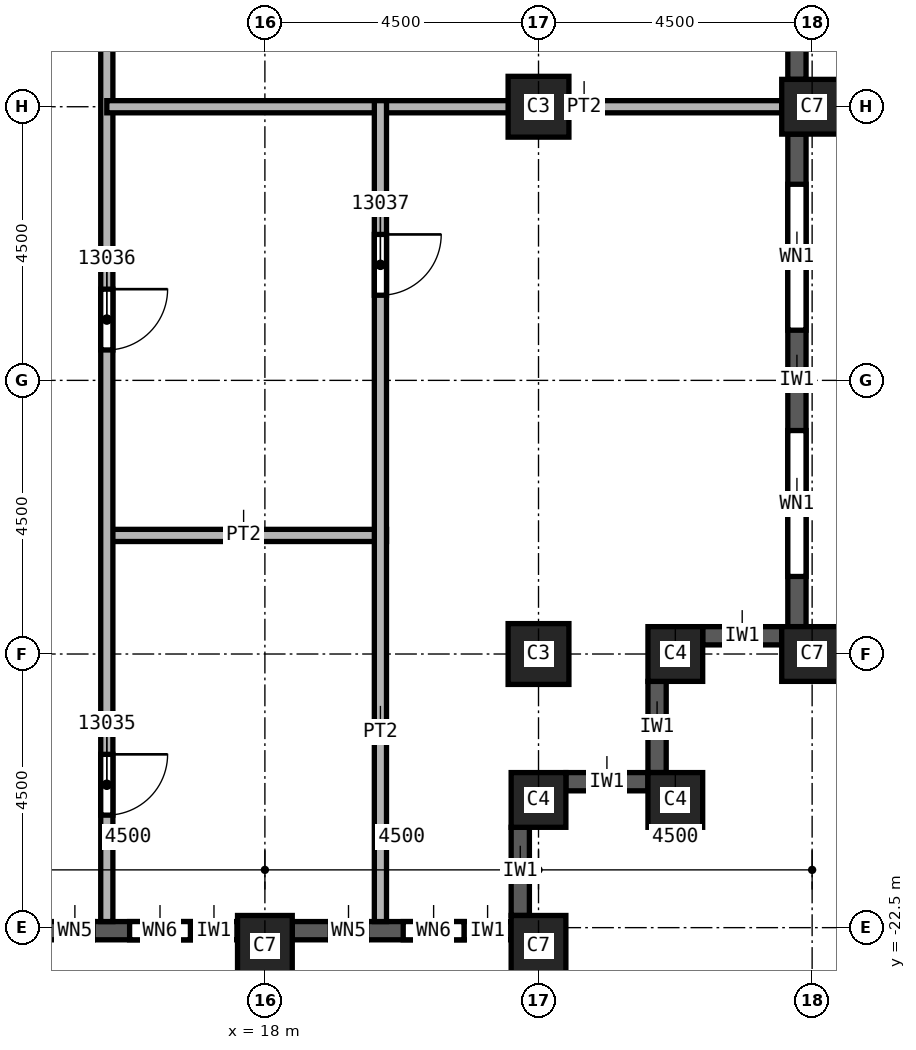
"""IFC4 building model, lengths in metres.
Left out: names, types, materials, properties, quantities, classifications, styles, units other than length and angle.
Written with IfcOpenShell. Run it as: python <this file> out.ifc"""

import sys

from ifc_helpers import new_model, si_unit, direction, frame, frame_2d, origin, origin_2d, place, context, subcontext, project, spatial, rectangle, extrude, element, fill, save


model = new_model("IFC4")
c1 = context("Model", 3, precision=1e-05, world=origin(), true_north=direction((0.0, 1.0)))
c2 = subcontext(c1, "Body", "Model", "MODEL_VIEW")
j1 = project(units=[si_unit("LENGTHUNIT", "METRE"), si_unit("PLANEANGLEUNIT", "RADIAN")], contexts=[c1])
p1 = place(None, origin())
s1 = spatial("IfcSite", under=j1, at=p1, CompositionType="ELEMENT")
p2 = place(p1, origin())
s2 = spatial("IfcBuilding", under=s1, at=p2, CompositionType="ELEMENT")
p3 = place(p2, frame((0.0, 0.0, 208.0)))
s3 = spatial("IfcBuildingStorey", under=s2, at=p3, CompositionType="ELEMENT", Elevation=208.0)
for number, where, z_axis, x_axis in (
    (1, (22.5, -9.0, 0.0), (0.0, 0.0, 1.0), (1.0, 0.0, 0.0)),
    (2, (22.5, -18.0, 0.0), (0.0, 0.0, 1.0), (1.0, 0.0, 0.0)),
):
    element("IfcColumn", number, at=place(p3, frame(where, z_axis=z_axis, x_axis=x_axis)), inside=s3, PredefinedType="COLUMN", context=c2, shape_type="SweptSolid", body=[
        extrude(rectangle(XDim=1.0, YDim=1.0, at=origin_2d()), origin(), (0.0, 0.0, 1.0), 3.72),
    ])
for number, where, z_axis, x_axis in (
    (3, (27.0, -9.0, 0.0), (0.0, 0.0, 1.0), (0.0, 1.0, 0.0)),
    (4, (27.0, -18.0, 0.0), (0.0, 0.0, 1.0), (0.0, 1.0, 0.0)),
    (5, (18.0, -22.8, 0.0), (0.0, 0.0, 1.0), (1.0, 0.0, 0.0)),
    (6, (22.5, -22.8, 0.0), (0.0, 0.0, 1.0), (1.0, 0.0, 0.0)),
):
    element("IfcColumn", number, at=place(p3, frame(where, z_axis=z_axis, x_axis=x_axis)), inside=s3, PredefinedType="COLUMN", context=c2, shape_type="SweptSolid", body=[
        extrude(rectangle(XDim=0.9, YDim=1.0, at=origin_2d()), origin(), (0.0, 0.0, 1.0), 3.72),
    ])
for number, where, z_axis, x_axis in (
    (7, (22.5, -20.4, 0.0), (0.0, 0.0, 1.0), (1.0, 0.0, 0.0)),
    (8, (24.75, -20.4, 0.0), (0.0, 0.0, 1.0), (1.0, 0.0, 0.0)),
    (9, (24.75, -18.0, 0.0), (0.0, 0.0, 1.0), (1.0, 0.0, 0.0)),
):
    element("IfcColumn", number, at=place(p3, frame(where, z_axis=z_axis, x_axis=x_axis)), inside=s3, PredefinedType="COLUMN", context=c2, shape_type="SweptSolid", body=[
        extrude(rectangle(XDim=0.9, YDim=0.9, at=origin_2d()), origin(), (0.0, 0.0, 1.0), 3.72),
    ])
p4 = place(p3, frame((13.95, -22.55, 0.0), z_axis=(0.0, 0.0, 1.0), x_axis=(1.0, 0.0, 0.0)))
e10 = element("IfcWall", 10, at=p4, inside=s3, PredefinedType="SOLIDWALL", context=c2, shape_type="SweptSolid", body=[
    extrude(rectangle(XDim=3.6, YDim=0.3, at=frame_2d((1.8, 0.0))), origin(), (0.0, 0.0, 1.0), 3.12),
])
p5 = place(p4, frame((0.625, 0.0, 0.8)))
e11 = element("IfcOpeningElement", 11, at=p5, cuts=e10, PredefinedType="OPENING", context=c2, shape_type="SweptSolid", body=[
    extrude(rectangle(XDim=0.6, YDim=1.95, at=frame_2d((0.3, 0.975))), frame((0.0, 0.15, 0.0), z_axis=(0.0, -1.0, 0.0), x_axis=(1.0, 0.0, 0.0)), (0.0, 0.0, 1.0), 0.3),
])
p6 = place(p4, frame((1.825, 0.0, 0.8)))
e12 = element("IfcOpeningElement", 12, at=p6, cuts=e10, PredefinedType="OPENING", context=c2, shape_type="SweptSolid", body=[
    extrude(rectangle(XDim=1.0, YDim=1.95, at=frame_2d((0.5, 0.975))), frame((0.0, 0.15, 0.0), z_axis=(0.0, -1.0, 0.0), x_axis=(1.0, 0.0, 0.0)), (0.0, 0.0, 1.0), 0.3),
])
p7 = place(p3, frame((18.45, -22.55, 0.0), z_axis=(0.0, 0.0, 1.0), x_axis=(1.0, 0.0, 0.0)))
e13 = element("IfcWall", 13, at=p7, inside=s3, PredefinedType="SOLIDWALL", context=c2, shape_type="SweptSolid", body=[
    extrude(rectangle(XDim=3.6, YDim=0.3, at=frame_2d((1.8, 0.0))), origin(), (0.0, 0.0, 1.0), 3.12),
])
p8 = place(p7, frame((0.625, 0.0, 0.8)))
e14 = element("IfcOpeningElement", 14, at=p8, cuts=e13, PredefinedType="OPENING", context=c2, shape_type="SweptSolid", body=[
    extrude(rectangle(XDim=0.6, YDim=1.95, at=frame_2d((0.3, 0.975))), frame((0.0, 0.15, 0.0), z_axis=(0.0, -1.0, 0.0), x_axis=(1.0, 0.0, 0.0)), (0.0, 0.0, 1.0), 0.3),
])
p9 = place(p7, frame((1.825, 0.0, 0.8)))
e15 = element("IfcOpeningElement", 15, at=p9, cuts=e13, PredefinedType="OPENING", context=c2, shape_type="SweptSolid", body=[
    extrude(rectangle(XDim=1.0, YDim=1.95, at=frame_2d((0.5, 0.975))), frame((0.0, 0.15, 0.0), z_axis=(0.0, -1.0, 0.0), x_axis=(1.0, 0.0, 0.0)), (0.0, 0.0, 1.0), 0.3),
])
p10 = place(p3, frame((22.2, -22.3, 0.0), z_axis=(0.0, 0.0, 1.0), x_axis=(0.0, 1.0, 0.0)))
e16 = element("IfcWall", 16, at=p10, inside=s3, PredefinedType="SOLIDWALL", context=c2, shape_type="SweptSolid", body=[
    extrude(rectangle(XDim=1.45, YDim=0.3, at=frame_2d((0.725, 0.0))), origin(), (0.0, 0.0, 1.0), 3.12),
])
p11 = place(p3, frame((22.95, -20.1, 0.0), z_axis=(0.0, 0.0, 1.0), x_axis=(1.0, 0.0, 0.0)))
e17 = element("IfcWall", 17, at=p11, inside=s3, PredefinedType="SOLIDWALL", context=c2, shape_type="SweptSolid", body=[
    extrude(rectangle(XDim=1.35, YDim=0.3, at=frame_2d((0.675, 0.0))), origin(), (0.0, 0.0, 1.0), 3.12),
])
p12 = place(p3, frame((24.45, -19.95, 0.0), z_axis=(0.0, 0.0, 1.0), x_axis=(0.0, 1.0, 0.0)))
e18 = element("IfcWall", 18, at=p12, inside=s3, PredefinedType="SOLIDWALL", context=c2, shape_type="SweptSolid", body=[
    extrude(rectangle(XDim=1.5, YDim=0.3, at=frame_2d((0.75, 0.0))), origin(), (0.0, 0.0, 1.0), 3.12),
])
p13 = place(p3, frame((25.2, -17.7, 0.0), z_axis=(0.0, 0.0, 1.0), x_axis=(1.0, 0.0, 0.0)))
e19 = element("IfcWall", 19, at=p13, inside=s3, PredefinedType="SOLIDWALL", context=c2, shape_type="SweptSolid", body=[
    extrude(rectangle(XDim=1.3, YDim=0.3, at=frame_2d((0.65, 0.0))), origin(), (0.0, 0.0, 1.0), 3.12),
])
p14 = place(p3, frame((26.75, -17.55, 0.0), z_axis=(0.0, 0.0, 1.0), x_axis=(0.0, 1.0, 0.0)))
e20 = element("IfcWall", 20, at=p14, inside=s3, PredefinedType="SOLIDWALL", context=c2, shape_type="SweptSolid", body=[
    extrude(rectangle(XDim=8.1, YDim=0.3, at=frame_2d((4.05, 0.0))), origin(), (0.0, 0.0, 1.0), 3.12),
])
p15 = place(p14, frame((0.825, 0.0, 0.8)))
e21 = element("IfcOpeningElement", 21, at=p15, cuts=e20, PredefinedType="OPENING", context=c2, shape_type="SweptSolid", body=[
    extrude(rectangle(XDim=2.4, YDim=1.95, at=frame_2d((1.2, 0.975))), frame((0.0, 0.15, 0.0), z_axis=(0.0, -1.0, 0.0), x_axis=(1.0, 0.0, 0.0)), (0.0, 0.0, 1.0), 0.3),
])
p16 = place(p14, frame((4.875, 0.0, 0.8)))
e22 = element("IfcOpeningElement", 22, at=p16, cuts=e20, PredefinedType="OPENING", context=c2, shape_type="SweptSolid", body=[
    extrude(rectangle(XDim=2.4, YDim=1.95, at=frame_2d((1.2, 0.975))), frame((0.0, 0.15, 0.0), z_axis=(0.0, -1.0, 0.0), x_axis=(1.0, 0.0, 0.0)), (0.0, 0.0, 1.0), 0.3),
])
p17 = place(p3, frame((26.75, -8.55, 0.0), z_axis=(0.0, 0.0, 1.0), x_axis=(0.0, 1.0, 0.0)))
e23 = element("IfcWall", 23, at=p17, inside=s3, PredefinedType="SOLIDWALL", context=c2, shape_type="SweptSolid", body=[
    extrude(rectangle(XDim=8.1, YDim=0.3, at=frame_2d((4.05, 0.0))), origin(), (0.0, 0.0, 1.0), 3.12),
])
p18 = place(p17, frame((0.825, 0.0, 0.8)))
e24 = element("IfcOpeningElement", 24, at=p18, cuts=e23, PredefinedType="OPENING", context=c2, shape_type="SweptSolid", body=[
    extrude(rectangle(XDim=2.4, YDim=1.95, at=frame_2d((1.2, 0.975))), frame((0.0, 0.15, 0.0), z_axis=(0.0, -1.0, 0.0), x_axis=(1.0, 0.0, 0.0)), (0.0, 0.0, 1.0), 0.3),
])
p19 = place(p17, frame((4.875, 0.0, 0.8)))
e25 = element("IfcOpeningElement", 25, at=p19, cuts=e23, PredefinedType="OPENING", context=c2, shape_type="SweptSolid", body=[
    extrude(rectangle(XDim=2.4, YDim=1.95, at=frame_2d((1.2, 0.975))), frame((0.0, 0.15, 0.0), z_axis=(0.0, -1.0, 0.0), x_axis=(1.0, 0.0, 0.0)), (0.0, 0.0, 1.0), 0.3),
])
p20 = place(p3, frame((15.4, -16.05, 0.0), z_axis=(0.0, 0.0, 1.0), x_axis=(1.0, 0.0, 0.0)))
e26 = element("IfcWall", 26, at=p20, inside=s3, PredefinedType="PARTITIONING", context=c2, shape_type="SweptSolid", body=[
    extrude(rectangle(XDim=4.6, YDim=0.2, at=frame_2d((2.3, 0.0))), origin(), (0.0, 0.0, 1.0), 3.72),
])
p21 = place(p3, frame((15.4, 22.4, 0.0), z_axis=(0.0, 0.0, 1.0), x_axis=(0.0, -1.0, 0.0)))
e27 = element("IfcWall", 27, at=p21, inside=s3, PredefinedType="PARTITIONING", context=c2, shape_type="SweptSolid", body=[
    extrude(rectangle(XDim=44.8, YDim=0.2, at=frame_2d((22.4, 0.0))), origin(), (0.0, 0.0, 1.0), 3.72),
])
p22 = place(p21, frame((12.5, 0.0, 0.0)))
e28 = element("IfcOpeningElement", 28, at=p22, cuts=e27, PredefinedType="OPENING", context=c2, shape_type="SweptSolid", body=[
    extrude(rectangle(XDim=1.0, YDim=2.1, at=frame_2d((0.5, 1.05))), frame((0.0, 0.1, 0.0), z_axis=(0.0, -1.0, 0.0), x_axis=(1.0, 0.0, 0.0)), (0.0, 0.0, 1.0), 0.2),
])
p23 = place(p21, frame((7.7, 0.0, 0.0)))
e29 = element("IfcOpeningElement", 29, at=p23, cuts=e27, PredefinedType="OPENING", context=c2, shape_type="SweptSolid", body=[
    extrude(rectangle(XDim=1.0, YDim=2.1, at=frame_2d((0.5, 1.05))), frame((0.0, 0.1, 0.0), z_axis=(0.0, -1.0, 0.0), x_axis=(1.0, 0.0, 0.0)), (0.0, 0.0, 1.0), 0.2),
])
p24 = place(p21, frame((3.25, 0.0, 0.0)))
e30 = element("IfcOpeningElement", 30, at=p24, cuts=e27, PredefinedType="OPENING", context=c2, shape_type="SweptSolid", body=[
    extrude(rectangle(XDim=1.0, YDim=2.1, at=frame_2d((0.5, 1.05))), frame((0.0, 0.1, 0.0), z_axis=(0.0, -1.0, 0.0), x_axis=(1.0, 0.0, 0.0)), (0.0, 0.0, 1.0), 0.2),
])
p25 = place(p21, frame((42.05, 0.0, 0.0)))
e31 = element("IfcOpeningElement", 31, at=p25, cuts=e27, PredefinedType="OPENING", context=c2, shape_type="SweptSolid", body=[
    extrude(rectangle(XDim=1.0, YDim=2.1, at=frame_2d((0.5, 1.05))), frame((0.0, 0.1, 0.0), z_axis=(0.0, -1.0, 0.0), x_axis=(1.0, 0.0, 0.0)), (0.0, 0.0, 1.0), 0.2),
])
p26 = place(p21, frame((34.4, 0.0, 0.0)))
e32 = element("IfcOpeningElement", 32, at=p26, cuts=e27, PredefinedType="OPENING", context=c2, shape_type="SweptSolid", body=[
    extrude(rectangle(XDim=1.0, YDim=2.1, at=frame_2d((0.5, 1.05))), frame((0.0, 0.1, 0.0), z_axis=(0.0, -1.0, 0.0), x_axis=(1.0, 0.0, 0.0)), (0.0, 0.0, 1.0), 0.2),
])
p27 = place(p21, frame((27.05, 0.0, 0.0)))
e33 = element("IfcOpeningElement", 33, at=p27, cuts=e27, PredefinedType="OPENING", context=c2, shape_type="SweptSolid", body=[
    extrude(rectangle(XDim=1.0, YDim=2.1, at=frame_2d((0.5, 1.05))), frame((0.0, 0.1, 0.0), z_axis=(0.0, -1.0, 0.0), x_axis=(1.0, 0.0, 0.0)), (0.0, 0.0, 1.0), 0.2),
])
p28 = place(p21, frame((22.55, 0.0, 0.0)))
e34 = element("IfcOpeningElement", 34, at=p28, cuts=e27, PredefinedType="OPENING", context=c2, shape_type="SweptSolid", body=[
    extrude(rectangle(XDim=1.0, YDim=2.1, at=frame_2d((0.5, 1.05))), frame((0.0, 0.1, 0.0), z_axis=(0.0, -1.0, 0.0), x_axis=(1.0, 0.0, 0.0)), (0.0, 0.0, 1.0), 0.2),
])
p29 = place(p3, frame((15.4, -9.0, 0.0), z_axis=(0.0, 0.0, 1.0), x_axis=(1.0, 0.0, 0.0)))
e35 = element("IfcWall", 35, at=p29, inside=s3, PredefinedType="PARTITIONING", context=c2, shape_type="SweptSolid", body=[
    extrude(rectangle(XDim=11.1, YDim=0.2, at=frame_2d((5.55, 0.0))), origin(), (0.0, 0.0, 1.0), 3.72),
])
p30 = place(p3, frame((19.9, -8.9, 0.0), z_axis=(0.0, 0.0, 1.0), x_axis=(0.0, -1.0, 0.0)))
e36 = element("IfcWall", 36, at=p30, inside=s3, PredefinedType="PARTITIONING", context=c2, shape_type="SweptSolid", body=[
    extrude(rectangle(XDim=13.5, YDim=0.2, at=frame_2d((6.75, 0.0))), origin(), (0.0, 0.0, 1.0), 3.72),
])
p31 = place(p30, frame((2.2, 0.0, 0.0)))
e37 = element("IfcOpeningElement", 37, at=p31, cuts=e36, PredefinedType="OPENING", context=c2, shape_type="SweptSolid", body=[
    extrude(rectangle(XDim=1.0, YDim=2.1, at=frame_2d((0.5, 1.05))), frame((0.0, 0.1, 0.0), z_axis=(0.0, -1.0, 0.0), x_axis=(1.0, 0.0, 0.0)), (0.0, 0.0, 1.0), 0.2),
])
p32 = place(p15, origin())
e38 = element("IfcWindow", 38, at=p32, inside=s3, PartitioningType="SINGLE_PANEL", PredefinedType="WINDOW", context=c2, shape_type="SweptSolid", body=[
    extrude(rectangle(XDim=2.4, YDim=1.95, at=frame_2d((1.2, 0.975))), frame((0.0, 0.03, 0.0), z_axis=(0.0, -1.0, 0.0), x_axis=(1.0, 0.0, 0.0)), (0.0, 0.0, 1.0), 0.06),
])
fill(e21, e38)
p33 = place(p16, origin())
e39 = element("IfcWindow", 39, at=p33, inside=s3, PartitioningType="SINGLE_PANEL", PredefinedType="WINDOW", context=c2, shape_type="SweptSolid", body=[
    extrude(rectangle(XDim=2.4, YDim=1.95, at=frame_2d((1.2, 0.975))), frame((0.0, 0.03, 0.0), z_axis=(0.0, -1.0, 0.0), x_axis=(1.0, 0.0, 0.0)), (0.0, 0.0, 1.0), 0.06),
])
fill(e22, e39)
p34 = place(p25, origin())
e40 = element("IfcDoor", 40, at=p34, inside=s3, OperationType="SINGLE_SWING_RIGHT", PredefinedType="DOOR", context=c2, shape_type="SweptSolid", body=[
    extrude(rectangle(XDim=1.0, YDim=2.1, at=frame_2d((0.5, 1.05))), frame((0.0, 0.025, 0.0), z_axis=(0.0, -1.0, 0.0), x_axis=(1.0, 0.0, 0.0)), (0.0, 0.0, 1.0), 0.05),
])
fill(e31, e40)
p35 = place(p26, origin())
e41 = element("IfcDoor", 41, at=p35, inside=s3, OperationType="SINGLE_SWING_LEFT", PredefinedType="DOOR", context=c2, shape_type="SweptSolid", body=[
    extrude(rectangle(XDim=1.0, YDim=2.1, at=frame_2d((0.5, 1.05))), frame((0.0, 0.025, 0.0), z_axis=(0.0, -1.0, 0.0), x_axis=(1.0, 0.0, 0.0)), (0.0, 0.0, 1.0), 0.05),
])
fill(e32, e41)
p36 = place(p31, origin())
e42 = element("IfcDoor", 42, at=p36, inside=s3, OperationType="SINGLE_SWING_RIGHT", PredefinedType="DOOR", context=c2, shape_type="SweptSolid", body=[
    extrude(rectangle(XDim=1.0, YDim=2.1, at=frame_2d((0.5, 1.05))), frame((0.0, 0.025, 0.0), z_axis=(0.0, -1.0, 0.0), x_axis=(1.0, 0.0, 0.0)), (0.0, 0.0, 1.0), 0.05),
])
fill(e37, e42)
p37 = place(p5, origin())
e43 = element("IfcWindow", 43, at=p37, inside=s3, PartitioningType="SINGLE_PANEL", PredefinedType="WINDOW", context=c2, shape_type="SweptSolid", body=[
    extrude(rectangle(XDim=0.6, YDim=1.95, at=frame_2d((0.3, 0.975))), frame((0.0, 0.03, 0.0), z_axis=(0.0, -1.0, 0.0), x_axis=(1.0, 0.0, 0.0)), (0.0, 0.0, 1.0), 0.06),
])
fill(e11, e43)
p38 = place(p6, origin())
e44 = element("IfcWindow", 44, at=p38, inside=s3, PartitioningType="SINGLE_PANEL", PredefinedType="WINDOW", context=c2, shape_type="SweptSolid", body=[
    extrude(rectangle(XDim=1.0, YDim=1.95, at=frame_2d((0.5, 0.975))), frame((0.0, 0.03, 0.0), z_axis=(0.0, -1.0, 0.0), x_axis=(1.0, 0.0, 0.0)), (0.0, 0.0, 1.0), 0.06),
])
fill(e12, e44)
p39 = place(p8, origin())
e45 = element("IfcWindow", 45, at=p39, inside=s3, PartitioningType="SINGLE_PANEL", PredefinedType="WINDOW", context=c2, shape_type="SweptSolid", body=[
    extrude(rectangle(XDim=0.6, YDim=1.95, at=frame_2d((0.3, 0.975))), frame((0.0, 0.03, 0.0), z_axis=(0.0, -1.0, 0.0), x_axis=(1.0, 0.0, 0.0)), (0.0, 0.0, 1.0), 0.06),
])
fill(e14, e45)
p40 = place(p9, origin())
e46 = element("IfcWindow", 46, at=p40, inside=s3, PartitioningType="SINGLE_PANEL", PredefinedType="WINDOW", context=c2, shape_type="SweptSolid", body=[
    extrude(rectangle(XDim=1.0, YDim=1.95, at=frame_2d((0.5, 0.975))), frame((0.0, 0.03, 0.0), z_axis=(0.0, -1.0, 0.0), x_axis=(1.0, 0.0, 0.0)), (0.0, 0.0, 1.0), 0.06),
])
fill(e15, e46)
save(model, sys.argv[1])
